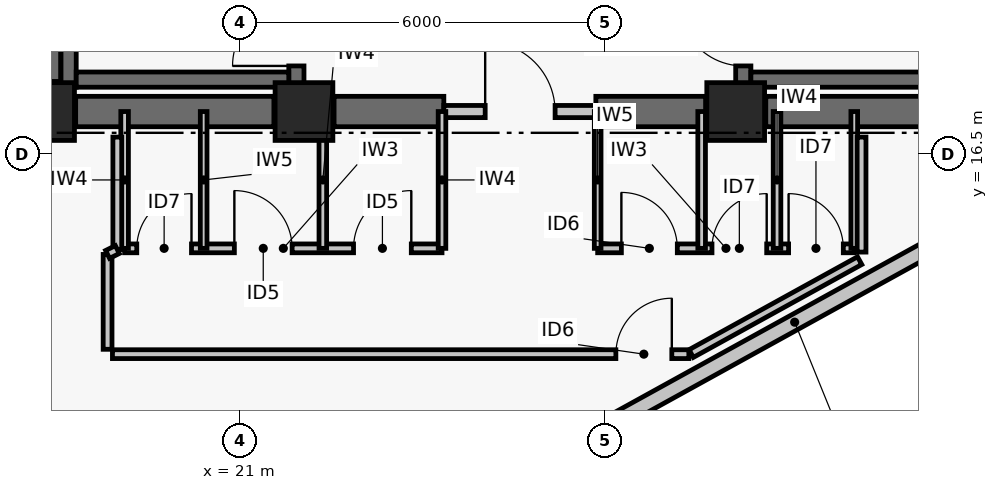
"""IFC4 building model, lengths in metres.
Left out: names, types, materials, properties, quantities, classifications, styles, units other than length and angle.
Written with IfcOpenShell. Run it as: python <this file> out.ifc"""

import sys

from ifc_helpers import new_model, si_unit, direction, frame, frame_2d, origin, origin_2d, place, context, subcontext, project, spatial, rectangle, extrude, element, fill, save


model = new_model("IFC4")
c1 = context("Model", 3, precision=1e-05, world=origin(), true_north=direction((0.0, 1.0)))
c2 = subcontext(c1, "Body", "Model", "MODEL_VIEW")
j1 = project(units=[si_unit("LENGTHUNIT", "METRE"), si_unit("PLANEANGLEUNIT", "RADIAN")], contexts=[c1])
p1 = place(None, origin())
s1 = spatial("IfcSite", under=j1, at=p1, CompositionType="ELEMENT")
p2 = place(p1, origin())
s2 = spatial("IfcBuilding", under=s1, at=p2, CompositionType="ELEMENT")
p3 = place(p2, frame((0.0, 0.0, 180.36)))
s3 = spatial("IfcBuildingStorey", under=s2, at=p3, CompositionType="ELEMENT", Elevation=180.36)
for number, where, z_axis, x_axis in (
    (1, (17.8, 17.2, 0.0), (0.0, 0.0, 1.0), (1.0, 0.0, 0.0)),
    (2, (22.05, 17.2, 0.0), (0.0, 0.0, 1.0), (1.0, 0.0, 0.0)),
    (3, (29.15, 17.2, 0.0), (0.0, 0.0, 1.0), (1.0, 0.0, 0.0)),
):
    element("IfcColumn", number, at=place(p3, frame(where, z_axis=z_axis, x_axis=x_axis)), inside=s3, PredefinedType="COLUMN", context=c2, shape_type="SweptSolid", body=[
        extrude(rectangle(XDim=0.95, YDim=0.95, at=origin_2d()), origin(), (0.0, 0.0, 1.0), 3.72),
    ])
p4 = place(p3, frame((18.295, 17.2, 0.0), z_axis=(0.0, 0.0, 1.0), x_axis=(1.0, 0.0, 0.0)))
e4 = element("IfcWall", 4, at=p4, inside=s3, PredefinedType="SHEAR", context=c2, shape_type="SweptSolid", body=[
    extrude(rectangle(XDim=3.26, YDim=0.5, at=frame_2d((1.63, 0.0))), origin(), (0.0, 0.0, 1.0), 3.5),
])
p5 = place(p3, frame((22.545, 17.2, 0.0), z_axis=(0.0, 0.0, 1.0), x_axis=(1.0, 0.0, 0.0)))
e5 = element("IfcWall", 5, at=p5, inside=s3, PredefinedType="SHEAR", context=c2, shape_type="SweptSolid", body=[
    extrude(rectangle(XDim=1.805, YDim=0.5, at=frame_2d((0.903, 0.0))), origin(), (0.0, 0.0, 1.0), 3.5),
])
p6 = place(p3, frame((26.85, 17.2, 0.0), z_axis=(0.0, 0.0, 1.0), x_axis=(1.0, 0.0, 0.0)))
e6 = element("IfcWall", 6, at=p6, inside=s3, PredefinedType="SHEAR", context=c2, shape_type="SweptSolid", body=[
    extrude(rectangle(XDim=1.805, YDim=0.5, at=frame_2d((0.902, 0.0))), origin(), (0.0, 0.0, 1.0), 3.5),
])
p7 = place(p3, frame((29.645, 17.2, 0.0), z_axis=(0.0, 0.0, 1.0), x_axis=(1.0, 0.0, 0.0)))
e7 = element("IfcWall", 7, at=p7, inside=s3, PredefinedType="SHEAR", context=c2, shape_type="SweptSolid", body=[
    extrude(rectangle(XDim=3.26, YDim=0.5, at=frame_2d((1.63, 0.0))), origin(), (0.0, 0.0, 1.0), 3.5),
])
p8 = place(p3, frame((17.8, 17.695, 0.0), z_axis=(0.0, 0.0, 1.0), x_axis=(0.0, 1.0, 0.0)))
e8 = element("IfcWall", 8, at=p8, inside=s3, PredefinedType="SHEAR", context=c2, shape_type="SweptSolid", body=[
    extrude(rectangle(XDim=8.61, YDim=0.5, at=frame_2d((4.305, 0.0))), origin(), (0.0, 0.0, 1.0), 3.5),
])
p9 = place(p3, frame((18.179, 17.6, 0.0), z_axis=(0.0, 0.0, 1.0), x_axis=(0.0, 1.0, 0.0)))
e9 = element("IfcWall", 9, at=p9, inside=s3, PredefinedType="SHEAR", context=c2, shape_type="SweptSolid", body=[
    extrude(rectangle(XDim=8.8, YDim=0.25, at=frame_2d((4.4, 0.0))), origin(), (0.0, 0.0, 1.0), 3.5),
])
p10 = place(p3, frame((21.925, 17.6, 0.0), z_axis=(0.0, 0.0, 1.0), x_axis=(0.0, 1.0, 0.0)))
e10 = element("IfcWall", 10, at=p10, inside=s3, PredefinedType="SHEAR", context=c2, shape_type="SweptSolid", body=[
    extrude(rectangle(XDim=8.8, YDim=0.25, at=frame_2d((4.4, 0.0))), origin(), (0.0, 0.0, 1.0), 3.5),
])
p11 = place(p10, frame((0.35, 0.0, 0.0)))
e11 = element("IfcOpeningElement", 11, at=p11, cuts=e10, PredefinedType="OPENING", context=c2, shape_type="SweptSolid", body=[
    extrude(rectangle(XDim=1.05, YDim=2.08, at=frame_2d((0.525, 1.04))), frame((0.0, 0.135, 0.0), z_axis=(0.0, -1.0, 0.0), x_axis=(1.0, 0.0, 0.0)), (0.0, 0.0, 1.0), 0.27),
])
p12 = place(p3, frame((18.304, 17.725, 0.0), z_axis=(0.0, 0.0, 1.0), x_axis=(1.0, 0.0, 0.0)))
e12 = element("IfcWall", 12, at=p12, inside=s3, PredefinedType="SHEAR", context=c2, shape_type="SweptSolid", body=[
    extrude(rectangle(XDim=3.496, YDim=0.25, at=frame_2d((1.748, 0.0))), origin(), (0.0, 0.0, 1.0), 3.5),
])
p13 = place(p3, frame((29.275, 17.6, 0.0), z_axis=(0.0, 0.0, 1.0), x_axis=(0.0, 1.0, 0.0)))
e13 = element("IfcWall", 13, at=p13, inside=s3, PredefinedType="SHEAR", context=c2, shape_type="SweptSolid", body=[
    extrude(rectangle(XDim=8.8, YDim=0.25, at=frame_2d((4.4, 0.0))), origin(), (0.0, 0.0, 1.0), 3.5),
])
p14 = place(p13, frame((0.35, 0.0, 0.0)))
e14 = element("IfcOpeningElement", 14, at=p14, cuts=e13, PredefinedType="OPENING", context=c2, shape_type="SweptSolid", body=[
    extrude(rectangle(XDim=1.05, YDim=2.08, at=frame_2d((0.525, 1.04))), frame((0.0, 0.135, 0.0), z_axis=(0.0, -1.0, 0.0), x_axis=(1.0, 0.0, 0.0)), (0.0, 0.0, 1.0), 0.27),
])
p15 = place(p3, frame((29.4, 17.725, 0.0), z_axis=(0.0, 0.0, 1.0), x_axis=(1.0, 0.0, 0.0)))
e15 = element("IfcWall", 15, at=p15, inside=s3, PredefinedType="SHEAR", context=c2, shape_type="SweptSolid", body=[
    extrude(rectangle(XDim=3.496, YDim=0.25, at=frame_2d((1.748, 0.0))), origin(), (0.0, 0.0, 1.0), 3.5),
])
p16 = place(p3, frame((33.195, 15.432, 0.0), z_axis=(0.0, 0.0, 1.0), x_axis=(-0.875663362897, -0.482922017389, 0.0)))
e16 = element("IfcWall", 16, at=p16, inside=s3, PredefinedType="PARTITIONING", context=c2, shape_type="SweptSolid", body=[
    extrude(rectangle(XDim=7.022, YDim=0.26, at=frame_2d((3.511, 0.0))), origin(), (0.0, 0.0, 1.0), 3.5),
])
p17 = place(p3, frame((24.35, 17.2, 0.0), z_axis=(0.0, 0.0, 1.0), x_axis=(1.0, 0.0, 0.0)))
e17 = element("IfcWall", 17, at=p17, inside=s3, PredefinedType="PARTITIONING", context=c2, shape_type="SweptSolid", body=[
    extrude(rectangle(XDim=2.5, YDim=0.2, at=frame_2d((1.25, 0.0))), origin(), (0.0, 0.0, 1.0), 2.63),
])
p18 = place(p17, frame((0.68, 0.0, 0.0)))
e18 = element("IfcOpeningElement", 18, at=p18, cuts=e17, PredefinedType="OPENING", context=c2, shape_type="SweptSolid", body=[
    extrude(rectangle(XDim=1.15, YDim=2.08, at=frame_2d((0.575, 1.04))), frame((0.0, 0.11, 0.0), z_axis=(0.0, -1.0, 0.0), x_axis=(1.0, 0.0, 0.0)), (0.0, 0.0, 1.0), 0.22),
])
p19 = place(p3, frame((19.1, 14.95, 0.0), z_axis=(0.0, 0.0, 1.0), x_axis=(1.0, 0.0, 0.0)))
e19 = element("IfcWall", 19, at=p19, inside=s3, PredefinedType="PARTITIONING", context=c2, shape_type="SweptSolid", body=[
    extrude(rectangle(XDim=5.22, YDim=0.145, at=frame_2d((2.61, 0.0))), origin(), (0.0, 0.0, 1.0), 2.73),
])
p20 = place(p19, frame((0.2, 0.0, 0.0)))
e20 = element("IfcOpeningElement", 20, at=p20, cuts=e19, PredefinedType="OPENING", context=c2, shape_type="SweptSolid", body=[
    extrude(rectangle(XDim=0.9, YDim=2.02, at=frame_2d((0.45, 1.01))), frame((0.0, 0.083, 0.0), z_axis=(0.0, -1.0, 0.0), x_axis=(1.0, 0.0, 0.0)), (0.0, 0.0, 1.0), 0.165),
])
p21 = place(p19, frame((1.805, 0.0, 0.0)))
e21 = element("IfcOpeningElement", 21, at=p21, cuts=e19, PredefinedType="OPENING", context=c2, shape_type="SweptSolid", body=[
    extrude(rectangle(XDim=0.95, YDim=2.06, at=frame_2d((0.475, 1.03))), frame((0.0, 0.083, 0.0), z_axis=(0.0, -1.0, 0.0), x_axis=(1.0, 0.0, 0.0)), (0.0, 0.0, 1.0), 0.165),
])
p22 = place(p19, frame((3.765, 0.0, 0.0)))
e22 = element("IfcOpeningElement", 22, at=p22, cuts=e19, PredefinedType="OPENING", context=c2, shape_type="SweptSolid", body=[
    extrude(rectangle(XDim=0.95, YDim=2.06, at=frame_2d((0.475, 1.03))), frame((0.0, 0.083, 0.0), z_axis=(0.0, -1.0, 0.0), x_axis=(1.0, 0.0, 0.0)), (0.0, 0.0, 1.0), 0.165),
])
p23 = place(p3, frame((26.88, 14.95, 0.0), z_axis=(0.0, 0.0, 1.0), x_axis=(1.0, 0.0, 0.0)))
e23 = element("IfcWall", 23, at=p23, inside=s3, PredefinedType="PARTITIONING", context=c2, shape_type="SweptSolid", body=[
    extrude(rectangle(XDim=4.22, YDim=0.145, at=frame_2d((2.11, 0.0))), origin(), (0.0, 0.0, 1.0), 2.93),
])
p24 = place(p23, frame((0.39, 0.0, 0.0)))
e24 = element("IfcOpeningElement", 24, at=p24, cuts=e23, PredefinedType="OPENING", context=c2, shape_type="SweptSolid", body=[
    extrude(rectangle(XDim=0.92, YDim=2.05, at=frame_2d((0.46, 1.025))), frame((0.0, 0.083, 0.0), z_axis=(0.0, -1.0, 0.0), x_axis=(1.0, 0.0, 0.0)), (0.0, 0.0, 1.0), 0.165),
])
p25 = place(p23, frame((1.88, 0.0, 0.0)))
e25 = element("IfcOpeningElement", 25, at=p25, cuts=e23, PredefinedType="OPENING", context=c2, shape_type="SweptSolid", body=[
    extrude(rectangle(XDim=0.9, YDim=2.02, at=frame_2d((0.45, 1.01))), frame((0.0, 0.083, 0.0), z_axis=(0.0, -1.0, 0.0), x_axis=(1.0, 0.0, 0.0)), (0.0, 0.0, 1.0), 0.165),
])
p26 = place(p23, frame((3.14, 0.0, 0.0)))
e26 = element("IfcOpeningElement", 26, at=p26, cuts=e23, PredefinedType="OPENING", context=c2, shape_type="SweptSolid", body=[
    extrude(rectangle(XDim=0.9, YDim=2.02, at=frame_2d((0.45, 1.01))), frame((0.0, 0.083, 0.0), z_axis=(0.0, -1.0, 0.0), x_axis=(1.0, 0.0, 0.0)), (0.0, 0.0, 1.0), 0.165),
])
p27 = place(p3, frame((19.1, 14.95, 0.0), z_axis=(0.0, 0.0, 1.0), x_axis=(0.0, 1.0, 0.0)))
e27 = element("IfcWall", 27, at=p27, inside=s3, PredefinedType="PARTITIONING", context=c2, shape_type="SweptSolid", body=[
    extrude(rectangle(XDim=2.25, YDim=0.125, at=frame_2d((1.125, 0.0))), origin(), (0.0, 0.0, 1.0), 2.63),
])
p28 = place(p3, frame((20.4, 14.95, 0.0), z_axis=(0.0, 0.0, 1.0), x_axis=(0.0, 1.0, 0.0)))
e28 = element("IfcWall", 28, at=p28, inside=s3, PredefinedType="PARTITIONING", context=c2, shape_type="SweptSolid", body=[
    extrude(rectangle(XDim=2.25, YDim=0.11, at=frame_2d((1.125, 0.0))), origin(), (0.0, 0.0, 1.0), 2.63),
])
for number, where, z_axis, x_axis in (
    (29, (22.36, 14.95, 0.0), (0.0, 0.0, 1.0), (0.0, 1.0, 0.0)),
    (30, (24.32, 14.95, 0.0), (0.0, 0.0, 1.0), (0.0, 1.0, 0.0)),
):
    element("IfcWall", number, at=place(p3, frame(where, z_axis=z_axis, x_axis=x_axis)), inside=s3, PredefinedType="PARTITIONING", context=c2, shape_type="SweptSolid", body=[
        extrude(rectangle(XDim=2.25, YDim=0.125, at=frame_2d((1.125, 0.0))), origin(), (0.0, 0.0, 1.0), 2.63),
    ])
p29 = place(p3, frame((26.88, 14.95, 0.0), z_axis=(0.0, 0.0, 1.0), x_axis=(0.0, 1.0, 0.0)))
e31 = element("IfcWall", 31, at=p29, inside=s3, PredefinedType="PARTITIONING", context=c2, shape_type="SweptSolid", body=[
    extrude(rectangle(XDim=2.25, YDim=0.11, at=frame_2d((1.125, 0.0))), origin(), (0.0, 0.0, 1.0), 2.63),
])
for number, where, z_axis, x_axis in (
    (32, (28.59, 14.95, 0.0), (0.0, 0.0, 1.0), (0.0, 1.0, 0.0)),
    (33, (29.83, 14.95, 0.0), (0.0, 0.0, 1.0), (0.0, 1.0, 0.0)),
):
    element("IfcWall", number, at=place(p3, frame(where, z_axis=z_axis, x_axis=x_axis)), inside=s3, PredefinedType="PARTITIONING", context=c2, shape_type="SweptSolid", body=[
        extrude(rectangle(XDim=2.25, YDim=0.125, at=frame_2d((1.125, 0.0))), origin(), (0.0, 0.0, 1.0), 2.63),
    ])
p30 = place(p3, frame((31.1, 14.95, 0.0), z_axis=(0.0, 0.0, 1.0), x_axis=(0.0, 1.0, 0.0)))
e34 = element("IfcWall", 34, at=p30, inside=s3, PredefinedType="PARTITIONING", context=c2, shape_type="SweptSolid", body=[
    extrude(rectangle(XDim=2.25, YDim=0.11, at=frame_2d((1.125, 0.0))), origin(), (0.0, 0.0, 1.0), 2.63),
])
p31 = place(p3, frame((18.98, 16.78, 0.0), z_axis=(0.0, 0.0, 1.0), x_axis=(0.0, -1.0, 0.0)))
e35 = element("IfcWall", 35, at=p31, inside=s3, PredefinedType="PARTITIONING", context=c2, shape_type="SweptSolid", body=[
    extrude(rectangle(XDim=1.85, YDim=0.145, at=frame_2d((0.925, 0.0))), origin(), (0.0, 0.0, 1.0), 2.63),
])
p32 = place(p3, frame((18.82, 14.85, 0.0), z_axis=(0.0, 0.0, 1.0), x_axis=(0.0, -1.0, 0.0)))
e36 = element("IfcWall", 36, at=p32, inside=s3, PredefinedType="PARTITIONING", context=c2, shape_type="SweptSolid", body=[
    extrude(rectangle(XDim=1.56, YDim=0.145, at=frame_2d((0.78, 0.0))), origin(), (0.0, 0.0, 1.0), 3.08),
])
p33 = place(p3, frame((18.9, 13.21, 0.0), z_axis=(0.0, 0.0, 1.0), x_axis=(1.0, 0.0, 0.0)))
e37 = element("IfcWall", 37, at=p33, inside=s3, PredefinedType="PARTITIONING", context=c2, shape_type="SweptSolid", body=[
    extrude(rectangle(XDim=9.479, YDim=0.145, at=frame_2d((4.74, 0.0))), origin(), (0.0, 0.0, 1.0), 2.73),
])
p34 = place(p33, frame((8.279, 0.0, 0.0)))
e38 = element("IfcOpeningElement", 38, at=p34, cuts=e37, PredefinedType="OPENING", context=c2, shape_type="SweptSolid", body=[
    extrude(rectangle(XDim=0.92, YDim=2.05, at=frame_2d((0.46, 1.025))), frame((0.0, 0.083, 0.0), z_axis=(0.0, -1.0, 0.0), x_axis=(1.0, 0.0, 0.0)), (0.0, 0.0, 1.0), 0.165),
])
p35 = place(p3, frame((28.418, 13.22, 0.0), z_axis=(0.0, 0.0, 1.0), x_axis=(0.875692450227, 0.48286927073, 0.0)))
e39 = element("IfcWall", 39, at=p35, inside=s3, PredefinedType="PARTITIONING", context=c2, shape_type="SweptSolid", body=[
    extrude(rectangle(XDim=3.164, YDim=0.145, at=frame_2d((1.582, 0.0))), origin(), (0.0, 0.0, 1.0), 3.5),
])
p36 = place(p3, frame((31.22, 14.889, 0.0), z_axis=(0.0, 0.0, 1.0), x_axis=(0.0, 1.0, 0.0)))
e40 = element("IfcWall", 40, at=p36, inside=s3, PredefinedType="PARTITIONING", context=c2, shape_type="SweptSolid", body=[
    extrude(rectangle(XDim=1.891, YDim=0.145, at=frame_2d((0.946, 0.0))), origin(), (0.0, 0.0, 1.0), 2.63),
])
p37 = place(p3, frame((18.82, 14.85, 0.0), z_axis=(0.0, 0.0, 1.0), x_axis=(0.89470021502, 0.446667130247, 0.0)))
e41 = element("IfcWall", 41, at=p37, inside=s3, PredefinedType="PARTITIONING", context=c2, shape_type="SweptSolid", body=[
    extrude(rectangle(XDim=0.179, YDim=0.145, at=frame_2d((0.089, 0.0))), origin(), (0.0, 0.0, 1.0), 3.5),
])
p38 = place(p11, origin())
e42 = element("IfcDoor", 42, at=p38, inside=s3, OperationType="SINGLE_SWING_LEFT", PredefinedType="DOOR", context=c2, shape_type="SweptSolid", body=[
    extrude(rectangle(XDim=1.05, YDim=2.08, at=frame_2d((0.525, 1.04))), frame((0.0, 0.025, 0.0), z_axis=(0.0, -1.0, 0.0), x_axis=(1.0, 0.0, 0.0)), (0.0, 0.0, 1.0), 0.05),
])
fill(e11, e42)
p39 = place(p14, origin())
e43 = element("IfcDoor", 43, at=p39, inside=s3, OperationType="SINGLE_SWING_RIGHT", PredefinedType="DOOR", context=c2, shape_type="SweptSolid", body=[
    extrude(rectangle(XDim=1.05, YDim=2.08, at=frame_2d((0.525, 1.04))), frame((0.0, 0.025, 0.0), z_axis=(0.0, -1.0, 0.0), x_axis=(1.0, 0.0, 0.0)), (0.0, 0.0, 1.0), 0.05),
])
fill(e14, e43)
p40 = place(p18, origin())
e44 = element("IfcDoor", 44, at=p40, inside=s3, OperationType="SINGLE_SWING_LEFT", PredefinedType="DOOR", context=c2, shape_type="SweptSolid", body=[
    extrude(rectangle(XDim=1.15, YDim=2.08, at=frame_2d((0.575, 1.04))), frame((0.0, 0.025, 0.0), z_axis=(0.0, -1.0, 0.0), x_axis=(1.0, 0.0, 0.0)), (0.0, 0.0, 1.0), 0.05),
])
fill(e18, e44)
p41 = place(p20, origin())
e45 = element("IfcDoor", 45, at=p41, inside=s3, OperationType="SINGLE_SWING_RIGHT", PredefinedType="DOOR", context=c2, shape_type="SweptSolid", body=[
    extrude(rectangle(XDim=0.9, YDim=2.02, at=frame_2d((0.45, 1.01))), frame((0.0, 0.025, 0.0), z_axis=(0.0, -1.0, 0.0), x_axis=(1.0, 0.0, 0.0)), (0.0, 0.0, 1.0), 0.05),
])
fill(e20, e45)
p42 = place(p21, origin())
e46 = element("IfcDoor", 46, at=p42, inside=s3, OperationType="SINGLE_SWING_LEFT", PredefinedType="DOOR", context=c2, shape_type="SweptSolid", body=[
    extrude(rectangle(XDim=0.95, YDim=2.06, at=frame_2d((0.475, 1.03))), frame((0.0, 0.025, 0.0), z_axis=(0.0, -1.0, 0.0), x_axis=(1.0, 0.0, 0.0)), (0.0, 0.0, 1.0), 0.05),
])
fill(e21, e46)
p43 = place(p22, origin())
e47 = element("IfcDoor", 47, at=p43, inside=s3, OperationType="SINGLE_SWING_RIGHT", PredefinedType="DOOR", context=c2, shape_type="SweptSolid", body=[
    extrude(rectangle(XDim=0.95, YDim=2.06, at=frame_2d((0.475, 1.03))), frame((0.0, 0.025, 0.0), z_axis=(0.0, -1.0, 0.0), x_axis=(1.0, 0.0, 0.0)), (0.0, 0.0, 1.0), 0.05),
])
fill(e22, e47)
p44 = place(p24, origin())
e48 = element("IfcDoor", 48, at=p44, inside=s3, OperationType="SINGLE_SWING_LEFT", PredefinedType="DOOR", context=c2, shape_type="SweptSolid", body=[
    extrude(rectangle(XDim=0.92, YDim=2.05, at=frame_2d((0.46, 1.025))), frame((0.0, 0.025, 0.0), z_axis=(0.0, -1.0, 0.0), x_axis=(1.0, 0.0, 0.0)), (0.0, 0.0, 1.0), 0.05),
])
fill(e24, e48)
p45 = place(p25, origin())
e49 = element("IfcDoor", 49, at=p45, inside=s3, OperationType="SINGLE_SWING_RIGHT", PredefinedType="DOOR", context=c2, shape_type="SweptSolid", body=[
    extrude(rectangle(XDim=0.9, YDim=2.02, at=frame_2d((0.45, 1.01))), frame((0.0, 0.025, 0.0), z_axis=(0.0, -1.0, 0.0), x_axis=(1.0, 0.0, 0.0)), (0.0, 0.0, 1.0), 0.05),
])
fill(e25, e49)
p46 = place(p26, origin())
e50 = element("IfcDoor", 50, at=p46, inside=s3, OperationType="SINGLE_SWING_LEFT", PredefinedType="DOOR", context=c2, shape_type="SweptSolid", body=[
    extrude(rectangle(XDim=0.9, YDim=2.02, at=frame_2d((0.45, 1.01))), frame((0.0, 0.025, 0.0), z_axis=(0.0, -1.0, 0.0), x_axis=(1.0, 0.0, 0.0)), (0.0, 0.0, 1.0), 0.05),
])
fill(e26, e50)
p47 = place(p34, origin())
e51 = element("IfcDoor", 51, at=p47, inside=s3, OperationType="SINGLE_SWING_RIGHT", PredefinedType="DOOR", context=c2, shape_type="SweptSolid", body=[
    extrude(rectangle(XDim=0.92, YDim=2.05, at=frame_2d((0.46, 1.025))), frame((0.0, 0.025, 0.0), z_axis=(0.0, -1.0, 0.0), x_axis=(1.0, 0.0, 0.0)), (0.0, 0.0, 1.0), 0.05),
])
fill(e38, e51)
save(model, sys.argv[1])
